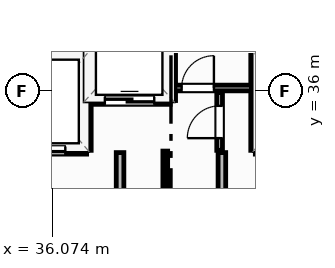
"""IFC4 building model, lengths in metres.
Left out: names, types, materials, properties, quantities, classifications, styles, units other than length and angle.
Written with IfcOpenShell. Run it as: python <this file> out.ifc"""

import sys

from ifc_helpers import new_model, si_unit, direction, frame, frame_2d, origin, place, context, subcontext, project, spatial, rectangle, extrude, element, fill, save


model = new_model("IFC4")
c1 = context("Model", 3, precision=1e-05, world=origin(), true_north=direction((0.0, 1.0)))
c2 = subcontext(c1, "Body", "Model", "MODEL_VIEW")
j1 = project(units=[si_unit("LENGTHUNIT", "METRE"), si_unit("PLANEANGLEUNIT", "RADIAN")], contexts=[c1])
p1 = place(None, origin())
s1 = spatial("IfcSite", under=j1, at=p1, CompositionType="ELEMENT")
p2 = place(p1, origin())
s2 = spatial("IfcBuilding", under=s1, at=p2, CompositionType="ELEMENT")
p3 = place(p2, frame((0.0, 0.0, 140.2)))
s3 = spatial("IfcBuildingStorey", under=s2, at=p3, CompositionType="ELEMENT", Elevation=140.2)
for number, where, z_axis, x_axis in (
    (1, (37.86, 29.2, 0.0), (0.0, 0.0, 1.0), (0.0, 1.0, 0.0)),
    (2, (40.54, 29.2, 0.0), (0.0, 0.0, 1.0), (0.0, 1.0, 0.0)),
):
    element("IfcWall", number, at=place(p3, frame(where, z_axis=z_axis, x_axis=x_axis)), inside=s3, PredefinedType="PARTITIONING", context=c2, shape_type="SweptSolid", body=[
        extrude(rectangle(XDim=5.18, YDim=0.2, at=frame_2d((2.59, 0.0))), origin(), (0.0, 0.0, 1.0), 3.45),
    ])
p4 = place(p3, frame((34.8, 34.44, 0.0), z_axis=(0.0, 0.0, 1.0), x_axis=(1.0, 0.0, 0.0)))
e3 = element("IfcWall", 3, at=p4, inside=s3, PredefinedType="PARTITIONING", context=c2, shape_type="SweptSolid", body=[
    extrude(rectangle(XDim=2.18, YDim=0.2, at=frame_2d((1.09, 0.0))), origin(), (0.0, 0.0, 1.0), 3.45),
])
p5 = place(p4, frame((0.42, 0.0, 0.0)))
e4 = element("IfcOpeningElement", 4, at=p5, cuts=e3, PredefinedType="OPENING", context=c2, shape_type="SweptSolid", body=[
    extrude(rectangle(XDim=1.2, YDim=2.2, at=frame_2d((0.6, 1.1))), frame((0.0, 0.11, 0.0), z_axis=(0.0, -1.0, 0.0), x_axis=(1.0, 0.0, 0.0)), (0.0, 0.0, 1.0), 0.22),
])
p6 = place(p3, frame((34.8, 36.98, 0.0), z_axis=(0.0, 0.0, 1.0), x_axis=(1.0, 0.0, 0.0)))
e5 = element("IfcWall", 5, at=p6, inside=s3, PredefinedType="PARTITIONING", context=c2, shape_type="SweptSolid", body=[
    extrude(rectangle(XDim=2.18, YDim=0.2, at=frame_2d((1.09, 0.0))), origin(), (0.0, 0.0, 1.0), 3.45),
])
for number, where, z_axis, x_axis in (
    (6, (37.0, 34.44, 0.0), (0.0, 0.0, 1.0), (0.0, 1.0, 0.0)),
    (7, (41.4, 34.44, 0.0), (0.0, 0.0, 1.0), (0.0, 1.0, 0.0)),
):
    element("IfcWall", number, at=place(p3, frame(where, z_axis=z_axis, x_axis=x_axis)), inside=s3, PredefinedType="PARTITIONING", context=c2, shape_type="SweptSolid", body=[
        extrude(rectangle(XDim=3.9, YDim=0.2, at=frame_2d((1.95, 0.0))), origin(), (0.0, 0.0, 1.0), 3.45),
    ])
p7 = place(p3, frame((37.06, 35.75, 0.0), z_axis=(0.0, 0.0, 1.0), x_axis=(1.0, 0.0, 0.0)))
e8 = element("IfcWall", 8, at=p7, inside=s3, PredefinedType="PARTITIONING", context=c2, shape_type="SweptSolid", body=[
    extrude(rectangle(XDim=2.12, YDim=0.2, at=frame_2d((1.06, 0.0))), origin(), (0.0, 0.0, 1.0), 3.45),
])
p8 = place(p7, frame((0.4, 0.0, 0.0)))
e9 = element("IfcOpeningElement", 9, at=p8, cuts=e8, PredefinedType="OPENING", context=c2, shape_type="SweptSolid", body=[
    extrude(rectangle(XDim=1.3, YDim=2.2, at=frame_2d((0.65, 1.1))), frame((0.0, 0.11, 0.0), z_axis=(0.0, -1.0, 0.0), x_axis=(1.0, 0.0, 0.0)), (0.0, 0.0, 1.0), 0.22),
])
p9 = place(p3, frame((39.22, 35.75, 0.0), z_axis=(0.0, 0.0, 1.0), x_axis=(0.0, 1.0, 0.0)))
e10 = element("IfcWall", 10, at=p9, inside=s3, PredefinedType="PARTITIONING", context=c2, shape_type="SweptSolid", body=[
    extrude(rectangle(XDim=2.59, YDim=0.2, at=frame_2d((1.295, 0.0))), origin(), (0.0, 0.0, 1.0), 3.45),
])
p10 = place(p3, frame((39.3, 36.08, 0.0), z_axis=(0.0, 0.0, 1.0), x_axis=(1.0, 0.0, 0.0)))
e11 = element("IfcWall", 11, at=p10, inside=s3, PredefinedType="PARTITIONING", context=c2, shape_type="SweptSolid", body=[
    extrude(rectangle(XDim=2.02, YDim=0.15, at=frame_2d((1.01, 0.0))), origin(), (0.0, 0.0, 1.0), 3.45),
])
p11 = place(p10, frame((0.18, 0.0, 0.0)))
e12 = element("IfcOpeningElement", 12, at=p11, cuts=e11, PredefinedType="OPENING", context=c2, shape_type="SweptSolid", body=[
    extrude(rectangle(XDim=0.85, YDim=2.05, at=frame_2d((0.425, 1.025))), frame((0.0, 0.085, 0.0), z_axis=(0.0, -1.0, 0.0), x_axis=(1.0, 0.0, 0.0)), (0.0, 0.0, 1.0), 0.17),
])
p12 = place(p3, frame((40.48, 34.44, 0.0), z_axis=(0.0, 0.0, 1.0), x_axis=(0.0, 1.0, 0.0)))
e13 = element("IfcWall", 13, at=p12, inside=s3, PredefinedType="PARTITIONING", context=c2, shape_type="SweptSolid", body=[
    extrude(rectangle(XDim=1.52, YDim=0.15, at=frame_2d((0.76, 0.0))), origin(), (0.0, 0.0, 1.0), 3.45),
])
p13 = place(p12, frame((0.32, 0.0, 0.0)))
e14 = element("IfcOpeningElement", 14, at=p13, cuts=e13, PredefinedType="OPENING", context=c2, shape_type="SweptSolid", body=[
    extrude(rectangle(XDim=0.85, YDim=2.05, at=frame_2d((0.425, 1.025))), frame((0.0, 0.085, 0.0), z_axis=(0.0, -1.0, 0.0), x_axis=(1.0, 0.0, 0.0)), (0.0, 0.0, 1.0), 0.17),
])
p14 = place(p3, frame((39.05, 29.2, 0.0), z_axis=(0.0, 0.0, 1.0), x_axis=(0.0, 1.0, 0.0)))
e15 = element("IfcWall", 15, at=p14, inside=s3, PredefinedType="PARTITIONING", context=c2, shape_type="SweptSolid", body=[
    extrude(rectangle(XDim=5.22, YDim=0.125, at=frame_2d((2.61, 0.0))), origin(), (0.0, 0.0, 1.0), 3.45),
])
p15 = place(p14, frame((2.05, 0.0, 0.0)))
e16 = element("IfcOpeningElement", 16, at=p15, cuts=e15, PredefinedType="OPENING", context=c2, shape_type="SweptSolid", body=[
    extrude(rectangle(XDim=0.85, YDim=2.05, at=frame_2d((0.425, 1.025))), frame((0.0, 0.073, 0.0), z_axis=(0.0, -1.0, 0.0), x_axis=(1.0, 0.0, 0.0)), (0.0, 0.0, 1.0), 0.145),
])
p16 = place(p5, origin())
e17 = element("IfcDoor", 17, at=p16, inside=s3, OperationType="SLIDING_TO_LEFT", PredefinedType="DOOR", context=c2, shape_type="SweptSolid", body=[
    extrude(rectangle(XDim=1.2, YDim=2.2, at=frame_2d((0.6, 1.1))), frame((0.0, 0.025, 0.0), z_axis=(0.0, -1.0, 0.0), x_axis=(1.0, 0.0, 0.0)), (0.0, 0.0, 1.0), 0.05),
])
fill(e4, e17)
p17 = place(p8, origin())
e18 = element("IfcDoor", 18, at=p17, inside=s3, OperationType="SLIDING_TO_LEFT", PredefinedType="DOOR", context=c2, shape_type="SweptSolid", body=[
    extrude(rectangle(XDim=1.3, YDim=2.2, at=frame_2d((0.65, 1.1))), frame((0.0, 0.025, 0.0), z_axis=(0.0, -1.0, 0.0), x_axis=(1.0, 0.0, 0.0)), (0.0, 0.0, 1.0), 0.05),
])
fill(e9, e18)
p18 = place(p11, origin())
e19 = element("IfcDoor", 19, at=p18, inside=s3, OperationType="SINGLE_SWING_RIGHT", PredefinedType="DOOR", context=c2, shape_type="SweptSolid", body=[
    extrude(rectangle(XDim=0.85, YDim=2.05, at=frame_2d((0.425, 1.025))), frame((0.0, 0.025, 0.0), z_axis=(0.0, -1.0, 0.0), x_axis=(1.0, 0.0, 0.0)), (0.0, 0.0, 1.0), 0.05),
])
fill(e12, e19)
p19 = place(p13, origin())
e20 = element("IfcDoor", 20, at=p19, inside=s3, OperationType="SINGLE_SWING_LEFT", PredefinedType="DOOR", context=c2, shape_type="SweptSolid", body=[
    extrude(rectangle(XDim=0.85, YDim=2.05, at=frame_2d((0.425, 1.025))), frame((0.0, 0.025, 0.0), z_axis=(0.0, -1.0, 0.0), x_axis=(1.0, 0.0, 0.0)), (0.0, 0.0, 1.0), 0.05),
])
fill(e14, e20)
save(model, sys.argv[1])
